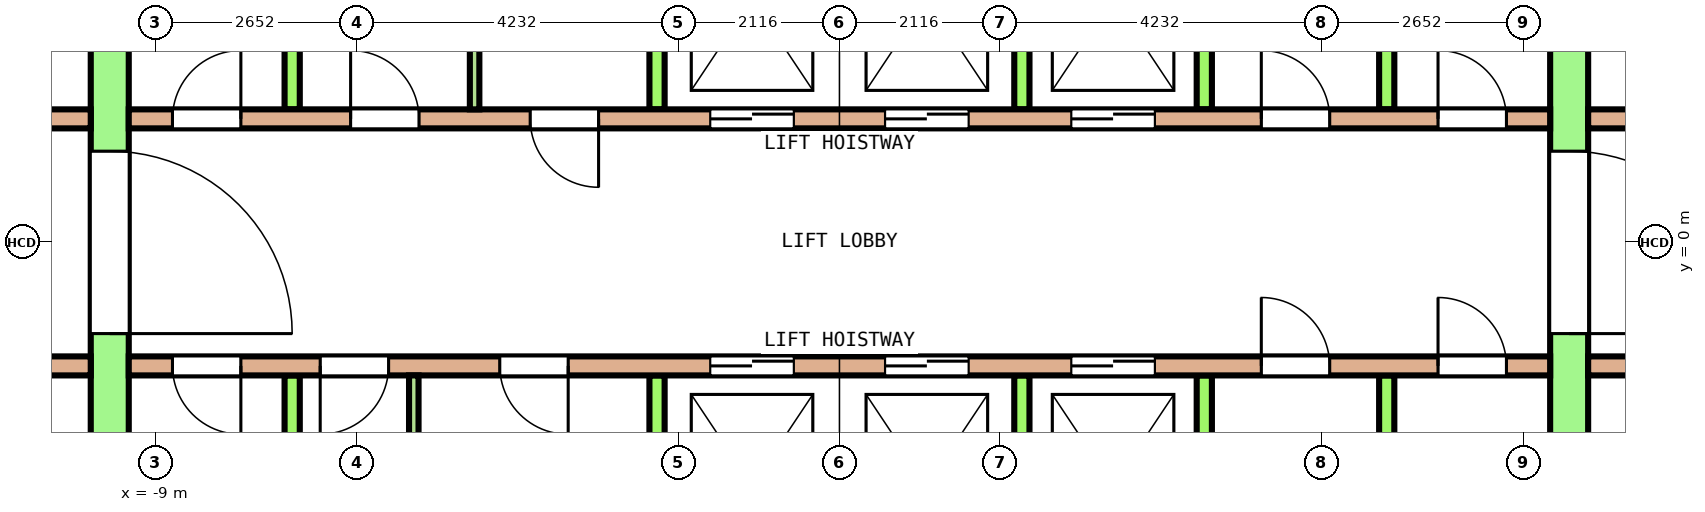
"""IFC4 building model, lengths in metres.
Left out: names, types, materials, properties, quantities, classifications, styles, units other than length and angle.
Written with IfcOpenShell. Run it as: python <this file> out.ifc"""

import sys

from ifc_helpers import new_model, si_unit, direction, frame, frame_2d, origin, place, context, subcontext, project, spatial, rectangle, extrude, element, fill, save


model = new_model("IFC4")
c1 = context("Model", 3, precision=1e-05, world=origin(), true_north=direction((0.0, 1.0)))
c2 = subcontext(c1, "Body", "Model", "MODEL_VIEW")
j1 = project(units=[si_unit("LENGTHUNIT", "METRE"), si_unit("PLANEANGLEUNIT", "RADIAN")], contexts=[c1])
p1 = place(None, origin())
s1 = spatial("IfcSite", under=j1, at=p1, CompositionType="ELEMENT")
p2 = place(p1, origin())
s2 = spatial("IfcBuilding", under=s1, at=p2, CompositionType="ELEMENT")
p3 = place(p2, frame((0.0, 0.0, 245.4)))
s3 = spatial("IfcBuildingStorey", under=s2, at=p3, CompositionType="ELEMENT", Elevation=245.4)
p4 = place(p3, frame((-9.6, -7.8, 0.0), z_axis=(0.0, 0.0, 1.0), x_axis=(0.0, 1.0, 0.0)))
e1 = element("IfcWall", 1, at=p4, inside=s3, PredefinedType="SHEAR", context=c2, shape_type="SweptSolid", body=[
    extrude(rectangle(XDim=15.6, YDim=0.5, at=frame_2d((7.8, 0.0))), origin(), (0.0, 0.0, 1.0), 3.7),
])
p5 = place(p4, frame((6.6, 0.0, 0.0)))
e2 = element("IfcOpeningElement", 2, at=p5, cuts=e1, PredefinedType="OPENING", context=c2, shape_type="SweptSolid", body=[
    extrude(rectangle(XDim=2.4, YDim=2.1, at=frame_2d((1.2, 1.05))), frame((0.0, 0.26, 0.0), z_axis=(0.0, -1.0, 0.0), x_axis=(1.0, 0.0, 0.0)), (0.0, 0.0, 1.0), 0.52),
])
p6 = place(p4, frame((13.5, 0.0, 0.0)))
e3 = element("IfcOpeningElement", 3, at=p6, cuts=e1, PredefinedType="OPENING", context=c2, shape_type="SweptSolid", body=[
    extrude(rectangle(XDim=1.2, YDim=2.1, at=frame_2d((0.6, 1.05))), frame((0.0, 0.26, 0.0), z_axis=(0.0, -1.0, 0.0), x_axis=(1.0, 0.0, 0.0)), (0.0, 0.0, 1.0), 0.52),
])
p7 = place(p4, frame((0.9, 0.0, 0.0)))
e4 = element("IfcOpeningElement", 4, at=p7, cuts=e1, PredefinedType="OPENING", context=c2, shape_type="SweptSolid", body=[
    extrude(rectangle(XDim=1.2, YDim=2.1, at=frame_2d((0.6, 1.05))), frame((0.0, 0.26, 0.0), z_axis=(0.0, -1.0, 0.0), x_axis=(1.0, 0.0, 0.0)), (0.0, 0.0, 1.0), 0.52),
])
p8 = place(p3, frame((9.6, -7.8, 0.0), z_axis=(0.0, 0.0, 1.0), x_axis=(0.0, 1.0, 0.0)))
e5 = element("IfcWall", 5, at=p8, inside=s3, PredefinedType="SHEAR", context=c2, shape_type="SweptSolid", body=[
    extrude(rectangle(XDim=15.6, YDim=0.5, at=frame_2d((7.8, 0.0))), origin(), (0.0, 0.0, 1.0), 3.7),
])
p9 = place(p8, frame((6.6, 0.0, 0.0)))
e6 = element("IfcOpeningElement", 6, at=p9, cuts=e5, PredefinedType="OPENING", context=c2, shape_type="SweptSolid", body=[
    extrude(rectangle(XDim=2.4, YDim=2.1, at=frame_2d((1.2, 1.05))), frame((0.0, 0.26, 0.0), z_axis=(0.0, -1.0, 0.0), x_axis=(1.0, 0.0, 0.0)), (0.0, 0.0, 1.0), 0.52),
])
p10 = place(p8, frame((13.5, 0.0, 0.0)))
e7 = element("IfcOpeningElement", 7, at=p10, cuts=e5, PredefinedType="OPENING", context=c2, shape_type="SweptSolid", body=[
    extrude(rectangle(XDim=1.2, YDim=2.1, at=frame_2d((0.6, 1.05))), frame((0.0, 0.26, 0.0), z_axis=(0.0, -1.0, 0.0), x_axis=(1.0, 0.0, 0.0)), (0.0, 0.0, 1.0), 0.52),
])
p11 = place(p8, frame((1.0, 0.0, 0.0)))
e8 = element("IfcOpeningElement", 8, at=p11, cuts=e5, PredefinedType="OPENING", context=c2, shape_type="SweptSolid", body=[
    extrude(rectangle(XDim=1.0, YDim=2.1, at=frame_2d((0.5, 1.05))), frame((0.0, 0.26, 0.0), z_axis=(0.0, -1.0, 0.0), x_axis=(1.0, 0.0, 0.0)), (0.0, 0.0, 1.0), 0.52),
])
p12 = place(p3, frame((-12.9, 1.625, 0.0), z_axis=(0.0, 0.0, 1.0), x_axis=(1.0, 0.0, 0.0)))
e9 = element("IfcWall", 9, at=p12, inside=s3, PredefinedType="SOLIDWALL", context=c2, shape_type="SweptSolid", body=[
    extrude(rectangle(XDim=3.05, YDim=0.25, at=frame_2d((1.525, 0.0))), origin(), (0.0, 0.0, 1.0), 3.7),
])
p13 = place(p12, frame((1.075, 0.0, 0.0)))
e10 = element("IfcOpeningElement", 10, at=p13, cuts=e9, PredefinedType="OPENING", context=c2, shape_type="SweptSolid", body=[
    extrude(rectangle(XDim=0.9, YDim=2.1, at=frame_2d((0.45, 1.05))), frame((0.0, 0.135, 0.0), z_axis=(0.0, -1.0, 0.0), x_axis=(1.0, 0.0, 0.0)), (0.0, 0.0, 1.0), 0.27),
])
p14 = place(p3, frame((-9.35, 1.625, 0.0), z_axis=(0.0, 0.0, 1.0), x_axis=(1.0, 0.0, 0.0)))
e11 = element("IfcWall", 11, at=p14, inside=s3, PredefinedType="SOLIDWALL", context=c2, shape_type="SweptSolid", body=[
    extrude(rectangle(XDim=18.7, YDim=0.25, at=frame_2d((9.35, 0.0))), origin(), (0.0, 0.0, 1.0), 3.7),
])
p15 = place(p14, frame((7.65, 0.0, 0.0)))
e12 = element("IfcOpeningElement", 12, at=p15, cuts=e11, PredefinedType="OPENING", context=c2, shape_type="SweptSolid", body=[
    extrude(rectangle(XDim=1.1, YDim=2.1, at=frame_2d((0.55, 1.05))), frame((0.0, 0.135, 0.0), z_axis=(0.0, -1.0, 0.0), x_axis=(1.0, 0.0, 0.0)), (0.0, 0.0, 1.0), 0.27),
])
p16 = place(p14, frame((9.95, 0.0, 0.0)))
e13 = element("IfcOpeningElement", 13, at=p16, cuts=e11, PredefinedType="OPENING", context=c2, shape_type="SweptSolid", body=[
    extrude(rectangle(XDim=1.1, YDim=2.1, at=frame_2d((0.55, 1.05))), frame((0.0, 0.135, 0.0), z_axis=(0.0, -1.0, 0.0), x_axis=(1.0, 0.0, 0.0)), (0.0, 0.0, 1.0), 0.27),
])
p17 = place(p14, frame((12.4, 0.0, 0.0)))
e14 = element("IfcOpeningElement", 14, at=p17, cuts=e11, PredefinedType="OPENING", context=c2, shape_type="SweptSolid", body=[
    extrude(rectangle(XDim=1.1, YDim=2.1, at=frame_2d((0.55, 1.05))), frame((0.0, 0.135, 0.0), z_axis=(0.0, -1.0, 0.0), x_axis=(1.0, 0.0, 0.0)), (0.0, 0.0, 1.0), 0.27),
])
p18 = place(p14, frame((0.575, 0.0, 0.0)))
e15 = element("IfcOpeningElement", 15, at=p18, cuts=e11, PredefinedType="OPENING", context=c2, shape_type="SweptSolid", body=[
    extrude(rectangle(XDim=0.9, YDim=2.1, at=frame_2d((0.45, 1.05))), frame((0.0, 0.135, 0.0), z_axis=(0.0, -1.0, 0.0), x_axis=(1.0, 0.0, 0.0)), (0.0, 0.0, 1.0), 0.27),
])
p19 = place(p14, frame((2.919, 0.0, 0.0)))
e16 = element("IfcOpeningElement", 16, at=p19, cuts=e11, PredefinedType="OPENING", context=c2, shape_type="SweptSolid", body=[
    extrude(rectangle(XDim=0.9, YDim=2.1, at=frame_2d((0.45, 1.05))), frame((0.0, 0.135, 0.0), z_axis=(0.0, -1.0, 0.0), x_axis=(1.0, 0.0, 0.0)), (0.0, 0.0, 1.0), 0.27),
])
p20 = place(p14, frame((5.281, 0.0, 0.0)))
e17 = element("IfcOpeningElement", 17, at=p20, cuts=e11, PredefinedType="OPENING", context=c2, shape_type="SweptSolid", body=[
    extrude(rectangle(XDim=0.9, YDim=2.1, at=frame_2d((0.45, 1.05))), frame((0.0, 0.135, 0.0), z_axis=(0.0, -1.0, 0.0), x_axis=(1.0, 0.0, 0.0)), (0.0, 0.0, 1.0), 0.27),
])
p21 = place(p14, frame((14.9, 0.0, 0.0)))
e18 = element("IfcOpeningElement", 18, at=p21, cuts=e11, PredefinedType="OPENING", context=c2, shape_type="SweptSolid", body=[
    extrude(rectangle(XDim=0.9, YDim=2.1, at=frame_2d((0.45, 1.05))), frame((0.0, 0.135, 0.0), z_axis=(0.0, -1.0, 0.0), x_axis=(1.0, 0.0, 0.0)), (0.0, 0.0, 1.0), 0.27),
])
p22 = place(p14, frame((17.225, 0.0, 0.0)))
e19 = element("IfcOpeningElement", 19, at=p22, cuts=e11, PredefinedType="OPENING", context=c2, shape_type="SweptSolid", body=[
    extrude(rectangle(XDim=0.9, YDim=2.1, at=frame_2d((0.45, 1.05))), frame((0.0, 0.135, 0.0), z_axis=(0.0, -1.0, 0.0), x_axis=(1.0, 0.0, 0.0)), (0.0, 0.0, 1.0), 0.27),
])
p23 = place(p3, frame((9.85, 1.625, 0.0), z_axis=(0.0, 0.0, 1.0), x_axis=(1.0, 0.0, 0.0)))
e20 = element("IfcWall", 20, at=p23, inside=s3, PredefinedType="SOLIDWALL", context=c2, shape_type="SweptSolid", body=[
    extrude(rectangle(XDim=3.05, YDim=0.25, at=frame_2d((1.525, 0.0))), origin(), (0.0, 0.0, 1.0), 3.7),
])
p24 = place(p23, frame((1.075, 0.0, 0.0)))
e21 = element("IfcOpeningElement", 21, at=p24, cuts=e20, PredefinedType="OPENING", context=c2, shape_type="SweptSolid", body=[
    extrude(rectangle(XDim=0.9, YDim=2.1, at=frame_2d((0.45, 1.05))), frame((0.0, 0.135, 0.0), z_axis=(0.0, -1.0, 0.0), x_axis=(1.0, 0.0, 0.0)), (0.0, 0.0, 1.0), 0.27),
])
for number, where, z_axis, x_axis in (
    (22, (-7.2, 1.75, 0.0), (0.0, 0.0, 1.0), (0.0, 1.0, 0.0)),
    (23, (-2.4, 1.75, 0.0), (0.0, 0.0, 1.0), (0.0, 1.0, 0.0)),
    (24, (2.4, 1.75, 0.0), (0.0, 0.0, 1.0), (0.0, 1.0, 0.0)),
    (25, (4.8, 1.75, 0.0), (0.0, 0.0, 1.0), (0.0, 1.0, 0.0)),
    (26, (7.2, 1.75, 0.0), (0.0, 0.0, 1.0), (0.0, 1.0, 0.0)),
):
    element("IfcWall", number, at=place(p3, frame(where, z_axis=z_axis, x_axis=x_axis)), inside=s3, PredefinedType="SOLIDWALL", context=c2, shape_type="SweptSolid", body=[
        extrude(rectangle(XDim=2.9, YDim=0.2, at=frame_2d((1.45, 0.0))), origin(), (0.0, 0.0, 1.0), 3.7),
    ])
p25 = place(p3, frame((-12.9, -1.625, 0.0), z_axis=(0.0, 0.0, 1.0), x_axis=(1.0, 0.0, 0.0)))
e27 = element("IfcWall", 27, at=p25, inside=s3, PredefinedType="SOLIDWALL", context=c2, shape_type="SweptSolid", body=[
    extrude(rectangle(XDim=3.05, YDim=0.25, at=frame_2d((1.525, 0.0))), origin(), (0.0, 0.0, 1.0), 3.7),
])
p26 = place(p25, frame((1.075, 0.0, 0.0)))
e28 = element("IfcOpeningElement", 28, at=p26, cuts=e27, PredefinedType="OPENING", context=c2, shape_type="SweptSolid", body=[
    extrude(rectangle(XDim=0.9, YDim=2.1, at=frame_2d((0.45, 1.05))), frame((0.0, 0.135, 0.0), z_axis=(0.0, -1.0, 0.0), x_axis=(1.0, 0.0, 0.0)), (0.0, 0.0, 1.0), 0.27),
])
p27 = place(p3, frame((-9.35, -1.625, 0.0), z_axis=(0.0, 0.0, 1.0), x_axis=(1.0, 0.0, 0.0)))
e29 = element("IfcWall", 29, at=p27, inside=s3, PredefinedType="SOLIDWALL", context=c2, shape_type="SweptSolid", body=[
    extrude(rectangle(XDim=18.7, YDim=0.25, at=frame_2d((9.35, 0.0))), origin(), (0.0, 0.0, 1.0), 3.7),
])
p28 = place(p27, frame((7.65, 0.0, 0.0)))
e30 = element("IfcOpeningElement", 30, at=p28, cuts=e29, PredefinedType="OPENING", context=c2, shape_type="SweptSolid", body=[
    extrude(rectangle(XDim=1.1, YDim=2.1, at=frame_2d((0.55, 1.05))), frame((0.0, 0.135, 0.0), z_axis=(0.0, -1.0, 0.0), x_axis=(1.0, 0.0, 0.0)), (0.0, 0.0, 1.0), 0.27),
])
p29 = place(p27, frame((9.95, 0.0, 0.0)))
e31 = element("IfcOpeningElement", 31, at=p29, cuts=e29, PredefinedType="OPENING", context=c2, shape_type="SweptSolid", body=[
    extrude(rectangle(XDim=1.1, YDim=2.1, at=frame_2d((0.55, 1.05))), frame((0.0, 0.135, 0.0), z_axis=(0.0, -1.0, 0.0), x_axis=(1.0, 0.0, 0.0)), (0.0, 0.0, 1.0), 0.27),
])
p30 = place(p27, frame((12.4, 0.0, 0.0)))
e32 = element("IfcOpeningElement", 32, at=p30, cuts=e29, PredefinedType="OPENING", context=c2, shape_type="SweptSolid", body=[
    extrude(rectangle(XDim=1.1, YDim=2.1, at=frame_2d((0.55, 1.05))), frame((0.0, 0.135, 0.0), z_axis=(0.0, -1.0, 0.0), x_axis=(1.0, 0.0, 0.0)), (0.0, 0.0, 1.0), 0.27),
])
p31 = place(p27, frame((0.575, 0.0, 0.0)))
e33 = element("IfcOpeningElement", 33, at=p31, cuts=e29, PredefinedType="OPENING", context=c2, shape_type="SweptSolid", body=[
    extrude(rectangle(XDim=0.9, YDim=2.1, at=frame_2d((0.45, 1.05))), frame((0.0, 0.135, 0.0), z_axis=(0.0, -1.0, 0.0), x_axis=(1.0, 0.0, 0.0)), (0.0, 0.0, 1.0), 0.27),
])
p32 = place(p27, frame((2.519, 0.0, 0.0)))
e34 = element("IfcOpeningElement", 34, at=p32, cuts=e29, PredefinedType="OPENING", context=c2, shape_type="SweptSolid", body=[
    extrude(rectangle(XDim=0.9, YDim=2.1, at=frame_2d((0.45, 1.05))), frame((0.0, 0.135, 0.0), z_axis=(0.0, -1.0, 0.0), x_axis=(1.0, 0.0, 0.0)), (0.0, 0.0, 1.0), 0.27),
])
p33 = place(p27, frame((4.881, 0.0, 0.0)))
e35 = element("IfcOpeningElement", 35, at=p33, cuts=e29, PredefinedType="OPENING", context=c2, shape_type="SweptSolid", body=[
    extrude(rectangle(XDim=0.9, YDim=2.1, at=frame_2d((0.45, 1.05))), frame((0.0, 0.135, 0.0), z_axis=(0.0, -1.0, 0.0), x_axis=(1.0, 0.0, 0.0)), (0.0, 0.0, 1.0), 0.27),
])
p34 = place(p27, frame((14.9, 0.0, 0.0)))
e36 = element("IfcOpeningElement", 36, at=p34, cuts=e29, PredefinedType="OPENING", context=c2, shape_type="SweptSolid", body=[
    extrude(rectangle(XDim=0.9, YDim=2.1, at=frame_2d((0.45, 1.05))), frame((0.0, 0.135, 0.0), z_axis=(0.0, -1.0, 0.0), x_axis=(1.0, 0.0, 0.0)), (0.0, 0.0, 1.0), 0.27),
])
p35 = place(p27, frame((17.225, 0.0, 0.0)))
e37 = element("IfcOpeningElement", 37, at=p35, cuts=e29, PredefinedType="OPENING", context=c2, shape_type="SweptSolid", body=[
    extrude(rectangle(XDim=0.9, YDim=2.1, at=frame_2d((0.45, 1.05))), frame((0.0, 0.135, 0.0), z_axis=(0.0, -1.0, 0.0), x_axis=(1.0, 0.0, 0.0)), (0.0, 0.0, 1.0), 0.27),
])
p36 = place(p3, frame((9.85, -1.625, 0.0), z_axis=(0.0, 0.0, 1.0), x_axis=(1.0, 0.0, 0.0)))
e38 = element("IfcWall", 38, at=p36, inside=s3, PredefinedType="SOLIDWALL", context=c2, shape_type="SweptSolid", body=[
    extrude(rectangle(XDim=3.05, YDim=0.25, at=frame_2d((1.525, 0.0))), origin(), (0.0, 0.0, 1.0), 3.7),
])
p37 = place(p36, frame((1.075, 0.0, 0.0)))
e39 = element("IfcOpeningElement", 39, at=p37, cuts=e38, PredefinedType="OPENING", context=c2, shape_type="SweptSolid", body=[
    extrude(rectangle(XDim=0.9, YDim=2.1, at=frame_2d((0.45, 1.05))), frame((0.0, 0.135, 0.0), z_axis=(0.0, -1.0, 0.0), x_axis=(1.0, 0.0, 0.0)), (0.0, 0.0, 1.0), 0.27),
])
for number, where, z_axis, x_axis in (
    (40, (-7.2, -4.65, 0.0), (0.0, 0.0, 1.0), (0.0, 1.0, 0.0)),
    (41, (-2.4, -4.65, 0.0), (0.0, 0.0, 1.0), (0.0, 1.0, 0.0)),
    (42, (2.4, -4.65, 0.0), (0.0, 0.0, 1.0), (0.0, 1.0, 0.0)),
    (43, (4.8, -4.65, 0.0), (0.0, 0.0, 1.0), (0.0, 1.0, 0.0)),
    (44, (7.2, -4.65, 0.0), (0.0, 0.0, 1.0), (0.0, 1.0, 0.0)),
):
    element("IfcWall", number, at=place(p3, frame(where, z_axis=z_axis, x_axis=x_axis)), inside=s3, PredefinedType="SOLIDWALL", context=c2, shape_type="SweptSolid", body=[
        extrude(rectangle(XDim=2.9, YDim=0.2, at=frame_2d((1.45, 0.0))), origin(), (0.0, 0.0, 1.0), 3.7),
    ])
for number, where, z_axis, x_axis in (
    (45, (-4.8, 1.75, 0.0), (0.0, 0.0, 1.0), (0.0, 1.0, 0.0)),
    (46, (-5.6, -4.65, 0.0), (0.0, 0.0, 1.0), (0.0, 1.0, 0.0)),
):
    element("IfcWall", number, at=place(p3, frame(where, z_axis=z_axis, x_axis=x_axis)), inside=s3, PredefinedType="PARTITIONING", context=c2, shape_type="SweptSolid", body=[
        extrude(rectangle(XDim=2.9, YDim=0.125, at=frame_2d((1.45, 0.0))), origin(), (0.0, 0.0, 1.0), 3.7),
    ])
p38 = place(p15, origin())
e47 = element("IfcDoor", 47, at=p38, inside=s3, OperationType="DOUBLE_DOOR_SLIDING", PredefinedType="DOOR", context=c2, shape_type="SweptSolid", body=[
    extrude(rectangle(XDim=1.1, YDim=2.1, at=frame_2d((0.55, 1.05))), frame((0.0, 0.075, 0.0), z_axis=(0.0, -1.0, 0.0), x_axis=(1.0, 0.0, 0.0)), (0.0, 0.0, 1.0), 0.15),
])
fill(e12, e47)
p39 = place(p16, origin())
e48 = element("IfcDoor", 48, at=p39, inside=s3, OperationType="DOUBLE_DOOR_SLIDING", PredefinedType="DOOR", context=c2, shape_type="SweptSolid", body=[
    extrude(rectangle(XDim=1.1, YDim=2.1, at=frame_2d((0.55, 1.05))), frame((0.0, 0.075, 0.0), z_axis=(0.0, -1.0, 0.0), x_axis=(1.0, 0.0, 0.0)), (0.0, 0.0, 1.0), 0.15),
])
fill(e13, e48)
p40 = place(p17, origin())
e49 = element("IfcDoor", 49, at=p40, inside=s3, OperationType="DOUBLE_DOOR_SLIDING", PredefinedType="DOOR", context=c2, shape_type="SweptSolid", body=[
    extrude(rectangle(XDim=1.1, YDim=2.1, at=frame_2d((0.55, 1.05))), frame((0.0, 0.075, 0.0), z_axis=(0.0, -1.0, 0.0), x_axis=(1.0, 0.0, 0.0)), (0.0, 0.0, 1.0), 0.15),
])
fill(e14, e49)
p41 = place(p28, origin())
e50 = element("IfcDoor", 50, at=p41, inside=s3, OperationType="DOUBLE_DOOR_SLIDING", PredefinedType="DOOR", context=c2, shape_type="SweptSolid", body=[
    extrude(rectangle(XDim=1.1, YDim=2.1, at=frame_2d((0.55, 1.05))), frame((0.0, 0.075, 0.0), z_axis=(0.0, -1.0, 0.0), x_axis=(1.0, 0.0, 0.0)), (0.0, 0.0, 1.0), 0.15),
])
fill(e30, e50)
p42 = place(p29, origin())
e51 = element("IfcDoor", 51, at=p42, inside=s3, OperationType="DOUBLE_DOOR_SLIDING", PredefinedType="DOOR", context=c2, shape_type="SweptSolid", body=[
    extrude(rectangle(XDim=1.1, YDim=2.1, at=frame_2d((0.55, 1.05))), frame((0.0, 0.075, 0.0), z_axis=(0.0, -1.0, 0.0), x_axis=(1.0, 0.0, 0.0)), (0.0, 0.0, 1.0), 0.15),
])
fill(e31, e51)
p43 = place(p30, origin())
e52 = element("IfcDoor", 52, at=p43, inside=s3, OperationType="DOUBLE_DOOR_SLIDING", PredefinedType="DOOR", context=c2, shape_type="SweptSolid", body=[
    extrude(rectangle(XDim=1.1, YDim=2.1, at=frame_2d((0.55, 1.05))), frame((0.0, 0.075, 0.0), z_axis=(0.0, -1.0, 0.0), x_axis=(1.0, 0.0, 0.0)), (0.0, 0.0, 1.0), 0.15),
])
fill(e32, e52)
p44 = place(p5, origin())
e53 = element("IfcDoor", 53, at=p44, inside=s3, OperationType="DOUBLE_DOOR_SINGLE_SWING", PredefinedType="DOOR", context=c2, shape_type="SweptSolid", body=[
    extrude(rectangle(XDim=2.4, YDim=2.1, at=frame_2d((1.2, 1.05))), frame((0.0, 0.2, 0.0), z_axis=(0.0, -1.0, 0.0), x_axis=(1.0, 0.0, 0.0)), (0.0, 0.0, 1.0), 0.4),
])
fill(e2, e53)
p45 = place(p9, origin())
e54 = element("IfcDoor", 54, at=p45, inside=s3, OperationType="DOUBLE_DOOR_SINGLE_SWING", PredefinedType="DOOR", context=c2, shape_type="SweptSolid", body=[
    extrude(rectangle(XDim=2.4, YDim=2.1, at=frame_2d((1.2, 1.05))), frame((0.0, 0.2, 0.0), z_axis=(0.0, -1.0, 0.0), x_axis=(1.0, 0.0, 0.0)), (0.0, 0.0, 1.0), 0.4),
])
fill(e6, e54)
p46 = place(p18, origin())
e55 = element("IfcDoor", 55, at=p46, inside=s3, OperationType="SINGLE_SWING_LEFT", PredefinedType="DOOR", context=c2, shape_type="SweptSolid", body=[
    extrude(rectangle(XDim=0.9, YDim=2.1, at=frame_2d((0.45, 1.05))), frame((0.0, 0.075, 0.0), z_axis=(0.0, -1.0, 0.0), x_axis=(1.0, 0.0, 0.0)), (0.0, 0.0, 1.0), 0.15),
])
fill(e15, e55)
p47 = place(p19, origin())
e56 = element("IfcDoor", 56, at=p47, inside=s3, OperationType="SINGLE_SWING_RIGHT", PredefinedType="DOOR", context=c2, shape_type="SweptSolid", body=[
    extrude(rectangle(XDim=0.9, YDim=2.1, at=frame_2d((0.45, 1.05))), frame((0.0, 0.075, 0.0), z_axis=(0.0, -1.0, 0.0), x_axis=(1.0, 0.0, 0.0)), (0.0, 0.0, 1.0), 0.15),
])
fill(e16, e56)
p48 = place(p20, origin())
e57 = element("IfcDoor", 57, at=p48, inside=s3, OperationType="SINGLE_SWING_LEFT", PredefinedType="DOOR", context=c2, shape_type="SweptSolid", body=[
    extrude(rectangle(XDim=0.9, YDim=2.1, at=frame_2d((0.45, 1.05))), frame((0.0, 0.075, 0.0), z_axis=(0.0, -1.0, 0.0), x_axis=(1.0, 0.0, 0.0)), (0.0, 0.0, 1.0), 0.15),
])
fill(e17, e57)
p49 = place(p21, origin())
e58 = element("IfcDoor", 58, at=p49, inside=s3, OperationType="SINGLE_SWING_RIGHT", PredefinedType="DOOR", context=c2, shape_type="SweptSolid", body=[
    extrude(rectangle(XDim=0.9, YDim=2.1, at=frame_2d((0.45, 1.05))), frame((0.0, 0.075, 0.0), z_axis=(0.0, -1.0, 0.0), x_axis=(1.0, 0.0, 0.0)), (0.0, 0.0, 1.0), 0.15),
])
fill(e18, e58)
p50 = place(p22, origin())
e59 = element("IfcDoor", 59, at=p50, inside=s3, OperationType="SINGLE_SWING_LEFT", PredefinedType="DOOR", context=c2, shape_type="SweptSolid", body=[
    extrude(rectangle(XDim=0.9, YDim=2.1, at=frame_2d((0.45, 1.05))), frame((0.0, 0.075, 0.0), z_axis=(0.0, -1.0, 0.0), x_axis=(1.0, 0.0, 0.0)), (0.0, 0.0, 1.0), 0.15),
])
fill(e19, e59)
p51 = place(p31, origin())
e60 = element("IfcDoor", 60, at=p51, inside=s3, OperationType="SINGLE_SWING_RIGHT", PredefinedType="DOOR", context=c2, shape_type="SweptSolid", body=[
    extrude(rectangle(XDim=0.9, YDim=2.1, at=frame_2d((0.45, 1.05))), frame((0.0, 0.075, 0.0), z_axis=(0.0, -1.0, 0.0), x_axis=(1.0, 0.0, 0.0)), (0.0, 0.0, 1.0), 0.15),
])
fill(e33, e60)
p52 = place(p32, origin())
e61 = element("IfcDoor", 61, at=p52, inside=s3, OperationType="SINGLE_SWING_LEFT", PredefinedType="DOOR", context=c2, shape_type="SweptSolid", body=[
    extrude(rectangle(XDim=0.9, YDim=2.1, at=frame_2d((0.45, 1.05))), frame((0.0, 0.075, 0.0), z_axis=(0.0, -1.0, 0.0), x_axis=(1.0, 0.0, 0.0)), (0.0, 0.0, 1.0), 0.15),
])
fill(e34, e61)
p53 = place(p33, origin())
e62 = element("IfcDoor", 62, at=p53, inside=s3, OperationType="SINGLE_SWING_RIGHT", PredefinedType="DOOR", context=c2, shape_type="SweptSolid", body=[
    extrude(rectangle(XDim=0.9, YDim=2.1, at=frame_2d((0.45, 1.05))), frame((0.0, 0.075, 0.0), z_axis=(0.0, -1.0, 0.0), x_axis=(1.0, 0.0, 0.0)), (0.0, 0.0, 1.0), 0.15),
])
fill(e35, e62)
p54 = place(p34, origin())
e63 = element("IfcDoor", 63, at=p54, inside=s3, OperationType="SINGLE_SWING_LEFT", PredefinedType="DOOR", context=c2, shape_type="SweptSolid", body=[
    extrude(rectangle(XDim=0.9, YDim=2.1, at=frame_2d((0.45, 1.05))), frame((0.0, 0.075, 0.0), z_axis=(0.0, -1.0, 0.0), x_axis=(1.0, 0.0, 0.0)), (0.0, 0.0, 1.0), 0.15),
])
fill(e36, e63)
p55 = place(p35, origin())
e64 = element("IfcDoor", 64, at=p55, inside=s3, OperationType="SINGLE_SWING_RIGHT", PredefinedType="DOOR", context=c2, shape_type="SweptSolid", body=[
    extrude(rectangle(XDim=0.9, YDim=2.1, at=frame_2d((0.45, 1.05))), frame((0.0, 0.075, 0.0), z_axis=(0.0, -1.0, 0.0), x_axis=(1.0, 0.0, 0.0)), (0.0, 0.0, 1.0), 0.15),
])
fill(e37, e64)
save(model, sys.argv[1])
